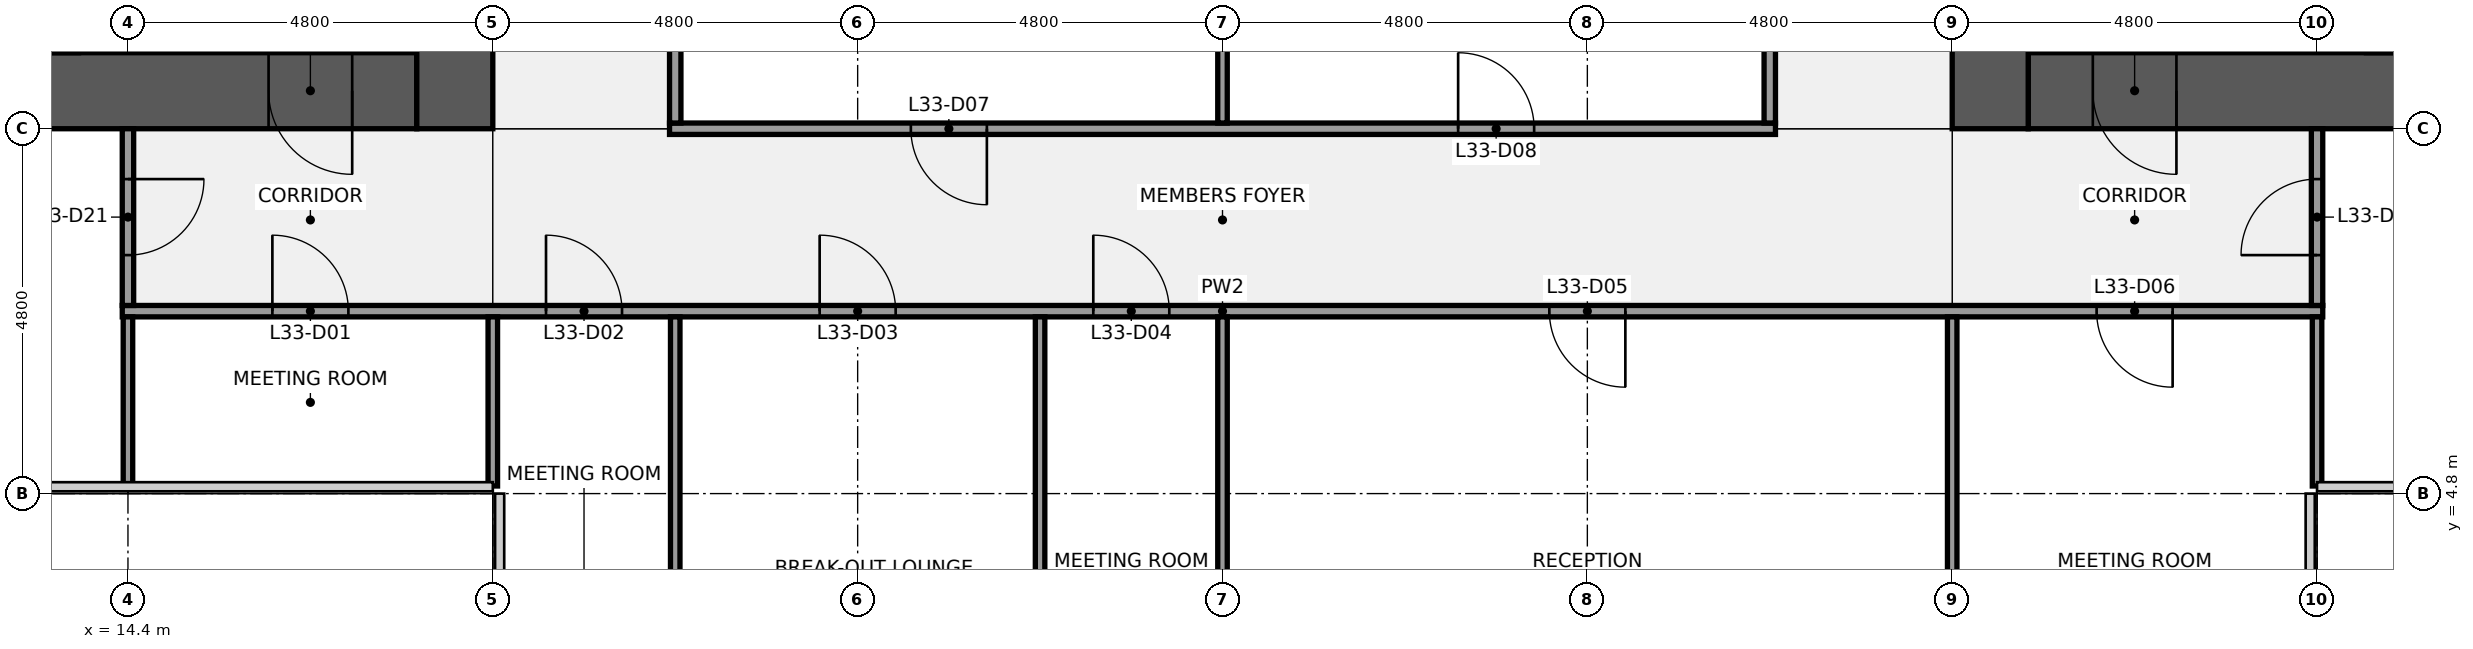
"""IFC4 building model, lengths in metres.
Left out: names, types, materials, properties, quantities, classifications, styles, units other than length and angle.
Written with IfcOpenShell. Run it as: python <this file> out.ifc"""

import sys

from ifc_helpers import new_model, si_unit, direction, frame, frame_2d, origin, place, context, subcontext, project, spatial, rectangle, extrude, element, fill, save


model = new_model("IFC4")
c1 = context("Model", 3, precision=1e-05, world=origin(), true_north=direction((0.0, 1.0)))
c2 = subcontext(c1, "Body", "Model", "MODEL_VIEW")
j1 = project(units=[si_unit("LENGTHUNIT", "METRE"), si_unit("PLANEANGLEUNIT", "RADIAN")], contexts=[c1])
p1 = place(None, origin())
s1 = spatial("IfcSite", under=j1, at=p1, CompositionType="ELEMENT")
p2 = place(p1, origin())
s2 = spatial("IfcBuilding", under=s1, at=p2, CompositionType="ELEMENT")
p3 = place(p2, frame((0.0, 0.0, 152.1)))
s3 = spatial("IfcBuildingStorey", under=s2, at=p3, CompositionType="ELEMENT", Elevation=152.1)
p4 = place(p3, frame((18.2, 10.1, 0.0), z_axis=(0.0, 0.0, 1.0), x_axis=(-1.0, 0.0, 0.0)))
e1 = element("IfcWall", 1, at=p4, inside=s3, PredefinedType="SHEAR", context=c2, shape_type="SweptSolid", body=[
    extrude(rectangle(XDim=8.6, YDim=1.0, at=frame_2d((4.3, 0.0))), origin(), (0.0, 0.0, 1.0), 3.84),
])
p5 = place(p4, frame((0.85, 0.0, 0.0)))
e2 = element("IfcOpeningElement", 2, at=p5, cuts=e1, PredefinedType="OPENING", context=c2, shape_type="SweptSolid", body=[
    extrude(rectangle(XDim=1.1, YDim=2.1, at=frame_2d((0.55, 1.05))), frame((0.0, 0.51, 0.0), z_axis=(0.0, -1.0, 0.0), x_axis=(1.0, 0.0, 0.0)), (0.0, 0.0, 1.0), 1.02),
])
p6 = place(p3, frame((18.7, 38.4, 0.0), z_axis=(0.0, 0.0, 1.0), x_axis=(0.0, -1.0, 0.0)))
e3 = element("IfcWall", 3, at=p6, inside=s3, PredefinedType="SHEAR", context=c2, shape_type="SweptSolid", body=[
    extrude(rectangle(XDim=28.8, YDim=1.0, at=frame_2d((14.4, 0.0))), origin(), (0.0, 0.0, 1.0), 3.84),
])
p7 = place(p6, frame((18.3, 0.0, 0.0)))
e4 = element("IfcOpeningElement", 4, at=p7, cuts=e3, PredefinedType="OPENING", context=c2, shape_type="SweptSolid", body=[
    extrude(rectangle(XDim=1.8, YDim=2.1, at=frame_2d((0.9, 1.05))), frame((0.0, 0.51, 0.0), z_axis=(0.0, -1.0, 0.0), x_axis=(1.0, 0.0, 0.0)), (0.0, 0.0, 1.0), 1.02),
])
p8 = place(p6, frame((8.7, 0.0, 0.0)))
e5 = element("IfcOpeningElement", 5, at=p8, cuts=e3, PredefinedType="OPENING", context=c2, shape_type="SweptSolid", body=[
    extrude(rectangle(XDim=1.8, YDim=2.1, at=frame_2d((0.9, 1.05))), frame((0.0, 0.51, 0.0), z_axis=(0.0, -1.0, 0.0), x_axis=(1.0, 0.0, 0.0)), (0.0, 0.0, 1.0), 1.02),
])
p9 = place(p3, frame((9.6, 10.7, 0.0), z_axis=(0.0, 0.0, 1.0), x_axis=(1.0, 0.0, 0.0)))
e6 = element("IfcWall", 6, at=p9, inside=s3, PredefinedType="SHEAR", context=c2, shape_type="SweptSolid", body=[
    extrude(rectangle(XDim=4.15, YDim=0.2, at=frame_2d((2.075, 0.0))), origin(), (0.0, 0.0, 1.0), 3.84),
])
p10 = place(p3, frame((48.0, 10.1, 0.0), z_axis=(0.0, 0.0, 1.0), x_axis=(-1.0, 0.0, 0.0)))
e7 = element("IfcWall", 7, at=p10, inside=s3, PredefinedType="SHEAR", context=c2, shape_type="SweptSolid", body=[
    extrude(rectangle(XDim=8.6, YDim=1.0, at=frame_2d((4.3, 0.0))), origin(), (0.0, 0.0, 1.0), 3.84),
])
p11 = place(p10, frame((6.65, 0.0, 0.0)))
e8 = element("IfcOpeningElement", 8, at=p11, cuts=e7, PredefinedType="OPENING", context=c2, shape_type="SweptSolid", body=[
    extrude(rectangle(XDim=1.1, YDim=2.1, at=frame_2d((0.55, 1.05))), frame((0.0, 0.51, 0.0), z_axis=(0.0, -1.0, 0.0), x_axis=(1.0, 0.0, 0.0)), (0.0, 0.0, 1.0), 1.02),
])
p12 = place(p3, frame((38.9, 9.6, 0.0), z_axis=(0.0, 0.0, 1.0), x_axis=(0.0, 1.0, 0.0)))
e9 = element("IfcWall", 9, at=p12, inside=s3, PredefinedType="SHEAR", context=c2, shape_type="SweptSolid", body=[
    extrude(rectangle(XDim=28.8, YDim=1.0, at=frame_2d((14.4, 0.0))), origin(), (0.0, 0.0, 1.0), 3.84),
])
p13 = place(p12, frame((8.7, 0.0, 0.0)))
e10 = element("IfcOpeningElement", 10, at=p13, cuts=e9, PredefinedType="OPENING", context=c2, shape_type="SweptSolid", body=[
    extrude(rectangle(XDim=1.8, YDim=2.1, at=frame_2d((0.9, 1.05))), frame((0.0, 0.51, 0.0), z_axis=(0.0, -1.0, 0.0), x_axis=(1.0, 0.0, 0.0)), (0.0, 0.0, 1.0), 1.02),
])
p14 = place(p12, frame((18.3, 0.0, 0.0)))
e11 = element("IfcOpeningElement", 11, at=p14, cuts=e9, PredefinedType="OPENING", context=c2, shape_type="SweptSolid", body=[
    extrude(rectangle(XDim=1.8, YDim=2.1, at=frame_2d((0.9, 1.05))), frame((0.0, 0.51, 0.0), z_axis=(0.0, -1.0, 0.0), x_axis=(1.0, 0.0, 0.0)), (0.0, 0.0, 1.0), 1.02),
])
p15 = place(p3, frame((43.85, 10.7, 0.0), z_axis=(0.0, 0.0, 1.0), x_axis=(1.0, 0.0, 0.0)))
e12 = element("IfcWall", 12, at=p15, inside=s3, PredefinedType="SHEAR", context=c2, shape_type="SweptSolid", body=[
    extrude(rectangle(XDim=4.15, YDim=0.2, at=frame_2d((2.075, 0.0))), origin(), (0.0, 0.0, 1.0), 3.84),
])
p16 = place(p3, frame((14.325, 7.2, 0.0), z_axis=(0.0, 0.0, 1.0), x_axis=(1.0, 0.0, 0.0)))
e13 = element("IfcWall", 13, at=p16, inside=s3, PredefinedType="PARTITIONING", context=c2, shape_type="SweptSolid", body=[
    extrude(rectangle(XDim=28.95, YDim=0.15, at=frame_2d((14.475, 0.0))), origin(), (0.0, 0.0, 1.0), 2.936),
])
p17 = place(p16, frame((1.975, 0.0, 0.0)))
e14 = element("IfcOpeningElement", 14, at=p17, cuts=e13, PredefinedType="OPENING", context=c2, shape_type="SweptSolid", body=[
    extrude(rectangle(XDim=1.0, YDim=2.1, at=frame_2d((0.5, 1.05))), frame((0.0, 0.085, 0.0), z_axis=(0.0, -1.0, 0.0), x_axis=(1.0, 0.0, 0.0)), (0.0, 0.0, 1.0), 0.17),
])
p18 = place(p16, frame((5.575, 0.0, 0.0)))
e15 = element("IfcOpeningElement", 15, at=p18, cuts=e13, PredefinedType="OPENING", context=c2, shape_type="SweptSolid", body=[
    extrude(rectangle(XDim=1.0, YDim=2.1, at=frame_2d((0.5, 1.05))), frame((0.0, 0.085, 0.0), z_axis=(0.0, -1.0, 0.0), x_axis=(1.0, 0.0, 0.0)), (0.0, 0.0, 1.0), 0.17),
])
p19 = place(p16, frame((9.175, 0.0, 0.0)))
e16 = element("IfcOpeningElement", 16, at=p19, cuts=e13, PredefinedType="OPENING", context=c2, shape_type="SweptSolid", body=[
    extrude(rectangle(XDim=1.0, YDim=2.1, at=frame_2d((0.5, 1.05))), frame((0.0, 0.085, 0.0), z_axis=(0.0, -1.0, 0.0), x_axis=(1.0, 0.0, 0.0)), (0.0, 0.0, 1.0), 0.17),
])
p20 = place(p16, frame((12.775, 0.0, 0.0)))
e17 = element("IfcOpeningElement", 17, at=p20, cuts=e13, PredefinedType="OPENING", context=c2, shape_type="SweptSolid", body=[
    extrude(rectangle(XDim=1.0, YDim=2.1, at=frame_2d((0.5, 1.05))), frame((0.0, 0.085, 0.0), z_axis=(0.0, -1.0, 0.0), x_axis=(1.0, 0.0, 0.0)), (0.0, 0.0, 1.0), 0.17),
])
p21 = place(p16, frame((18.775, 0.0, 0.0)))
e18 = element("IfcOpeningElement", 18, at=p21, cuts=e13, PredefinedType="OPENING", context=c2, shape_type="SweptSolid", body=[
    extrude(rectangle(XDim=1.0, YDim=2.1, at=frame_2d((0.5, 1.05))), frame((0.0, 0.085, 0.0), z_axis=(0.0, -1.0, 0.0), x_axis=(1.0, 0.0, 0.0)), (0.0, 0.0, 1.0), 0.17),
])
p22 = place(p16, frame((25.975, 0.0, 0.0)))
e19 = element("IfcOpeningElement", 19, at=p22, cuts=e13, PredefinedType="OPENING", context=c2, shape_type="SweptSolid", body=[
    extrude(rectangle(XDim=1.0, YDim=2.1, at=frame_2d((0.5, 1.05))), frame((0.0, 0.085, 0.0), z_axis=(0.0, -1.0, 0.0), x_axis=(1.0, 0.0, 0.0)), (0.0, 0.0, 1.0), 0.17),
])
p23 = place(p3, frame((21.525, 9.6, 0.0), z_axis=(0.0, 0.0, 1.0), x_axis=(1.0, 0.0, 0.0)))
e20 = element("IfcWall", 20, at=p23, inside=s3, PredefinedType="PARTITIONING", context=c2, shape_type="SweptSolid", body=[
    extrude(rectangle(XDim=14.55, YDim=0.15, at=frame_2d((7.275, 0.0))), origin(), (0.0, 0.0, 1.0), 2.936),
])
p24 = place(p23, frame((3.175, 0.0, 0.0)))
e21 = element("IfcOpeningElement", 21, at=p24, cuts=e20, PredefinedType="OPENING", context=c2, shape_type="SweptSolid", body=[
    extrude(rectangle(XDim=1.0, YDim=2.1, at=frame_2d((0.5, 1.05))), frame((0.0, 0.085, 0.0), z_axis=(0.0, -1.0, 0.0), x_axis=(1.0, 0.0, 0.0)), (0.0, 0.0, 1.0), 0.17),
])
p25 = place(p23, frame((10.375, 0.0, 0.0)))
e22 = element("IfcOpeningElement", 22, at=p25, cuts=e20, PredefinedType="OPENING", context=c2, shape_type="SweptSolid", body=[
    extrude(rectangle(XDim=1.0, YDim=2.1, at=frame_2d((0.5, 1.05))), frame((0.0, 0.085, 0.0), z_axis=(0.0, -1.0, 0.0), x_axis=(1.0, 0.0, 0.0)), (0.0, 0.0, 1.0), 0.17),
])
p26 = place(p3, frame((14.4, 4.9, 0.0), z_axis=(0.0, 0.0, 1.0), x_axis=(0.0, 1.0, 0.0)))
e23 = element("IfcWall", 23, at=p26, inside=s3, PredefinedType="PARTITIONING", context=c2, shape_type="SweptSolid", body=[
    extrude(rectangle(XDim=2.225, YDim=0.125, at=frame_2d((1.113, 0.0))), origin(), (0.0, 0.0, 1.0), 2.936),
])
p27 = place(p3, frame((14.4, 7.275, 0.0), z_axis=(0.0, 0.0, 1.0), x_axis=(0.0, 1.0, 0.0)))
e24 = element("IfcWall", 24, at=p27, inside=s3, PredefinedType="PARTITIONING", context=c2, shape_type="SweptSolid", body=[
    extrude(rectangle(XDim=2.325, YDim=0.15, at=frame_2d((1.163, 0.0))), origin(), (0.0, 0.0, 1.0), 2.936),
])
p28 = place(p27, frame((0.663, 0.0, 0.0)))
e25 = element("IfcOpeningElement", 25, at=p28, cuts=e24, PredefinedType="OPENING", context=c2, shape_type="SweptSolid", body=[
    extrude(rectangle(XDim=1.0, YDim=2.1, at=frame_2d((0.5, 1.05))), frame((0.0, 0.085, 0.0), z_axis=(0.0, -1.0, 0.0), x_axis=(1.0, 0.0, 0.0)), (0.0, 0.0, 1.0), 0.17),
])
p29 = place(p3, frame((19.2, 4.9, 0.0), z_axis=(0.0, 0.0, 1.0), x_axis=(0.0, 1.0, 0.0)))
e26 = element("IfcWall", 26, at=p29, inside=s3, PredefinedType="PARTITIONING", context=c2, shape_type="SweptSolid", body=[
    extrude(rectangle(XDim=2.225, YDim=0.125, at=frame_2d((1.113, 0.0))), origin(), (0.0, 0.0, 1.0), 2.936),
])
p30 = place(p3, frame((21.6, 0.1, 0.0), z_axis=(0.0, 0.0, 1.0), x_axis=(0.0, 1.0, 0.0)))
e27 = element("IfcWall", 27, at=p30, inside=s3, PredefinedType="PARTITIONING", context=c2, shape_type="SweptSolid", body=[
    extrude(rectangle(XDim=7.025, YDim=0.125, at=frame_2d((3.512, 0.0))), origin(), (0.0, 0.0, 1.0), 2.936),
])
p31 = place(p3, frame((21.6, 9.675, 0.0), z_axis=(0.0, 0.0, 1.0), x_axis=(0.0, 1.0, 0.0)))
e28 = element("IfcWall", 28, at=p31, inside=s3, PredefinedType="PARTITIONING", context=c2, shape_type="SweptSolid", body=[
    extrude(rectangle(XDim=4.65, YDim=0.15, at=frame_2d((2.325, 0.0))), origin(), (0.0, 0.0, 1.0), 2.936),
])
p32 = place(p3, frame((26.4, 0.1, 0.0), z_axis=(0.0, 0.0, 1.0), x_axis=(0.0, 1.0, 0.0)))
e29 = element("IfcWall", 29, at=p32, inside=s3, PredefinedType="PARTITIONING", context=c2, shape_type="SweptSolid", body=[
    extrude(rectangle(XDim=7.025, YDim=0.125, at=frame_2d((3.512, 0.0))), origin(), (0.0, 0.0, 1.0), 2.936),
])
p33 = place(p3, frame((28.8, 0.6, 0.0), z_axis=(0.0, 0.0, 1.0), x_axis=(0.0, 1.0, 0.0)))
e30 = element("IfcWall", 30, at=p33, inside=s3, PredefinedType="PARTITIONING", context=c2, shape_type="SweptSolid", body=[
    extrude(rectangle(XDim=6.525, YDim=0.125, at=frame_2d((3.262, 0.0))), origin(), (0.0, 0.0, 1.0), 2.936),
])
p34 = place(p3, frame((28.8, 9.675, 0.0), z_axis=(0.0, 0.0, 1.0), x_axis=(0.0, 1.0, 0.0)))
e31 = element("IfcWall", 31, at=p34, inside=s3, PredefinedType="PARTITIONING", context=c2, shape_type="SweptSolid", body=[
    extrude(rectangle(XDim=4.662, YDim=0.125, at=frame_2d((2.331, 0.0))), origin(), (0.0, 0.0, 1.0), 2.936),
])
p35 = place(p3, frame((36.0, 9.675, 0.0), z_axis=(0.0, 0.0, 1.0), x_axis=(0.0, 1.0, 0.0)))
e32 = element("IfcWall", 32, at=p35, inside=s3, PredefinedType="PARTITIONING", context=c2, shape_type="SweptSolid", body=[
    extrude(rectangle(XDim=4.65, YDim=0.15, at=frame_2d((2.325, 0.0))), origin(), (0.0, 0.0, 1.0), 2.936),
])
p36 = place(p3, frame((38.4, 0.6, 0.0), z_axis=(0.0, 0.0, 1.0), x_axis=(0.0, 1.0, 0.0)))
e33 = element("IfcWall", 33, at=p36, inside=s3, PredefinedType="PARTITIONING", context=c2, shape_type="SweptSolid", body=[
    extrude(rectangle(XDim=6.525, YDim=0.125, at=frame_2d((3.262, 0.0))), origin(), (0.0, 0.0, 1.0), 2.936),
])
p37 = place(p3, frame((43.2, 4.9, 0.0), z_axis=(0.0, 0.0, 1.0), x_axis=(0.0, 1.0, 0.0)))
e34 = element("IfcWall", 34, at=p37, inside=s3, PredefinedType="PARTITIONING", context=c2, shape_type="SweptSolid", body=[
    extrude(rectangle(XDim=2.225, YDim=0.125, at=frame_2d((1.113, 0.0))), origin(), (0.0, 0.0, 1.0), 2.936),
])
p38 = place(p3, frame((43.2, 7.275, 0.0), z_axis=(0.0, 0.0, 1.0), x_axis=(0.0, 1.0, 0.0)))
e35 = element("IfcWall", 35, at=p38, inside=s3, PredefinedType="PARTITIONING", context=c2, shape_type="SweptSolid", body=[
    extrude(rectangle(XDim=2.325, YDim=0.15, at=frame_2d((1.163, 0.0))), origin(), (0.0, 0.0, 1.0), 2.936),
])
p39 = place(p38, frame((0.663, 0.0, 0.0)))
e36 = element("IfcOpeningElement", 36, at=p39, cuts=e35, PredefinedType="OPENING", context=c2, shape_type="SweptSolid", body=[
    extrude(rectangle(XDim=1.0, YDim=2.1, at=frame_2d((0.5, 1.05))), frame((0.0, 0.085, 0.0), z_axis=(0.0, -1.0, 0.0), x_axis=(1.0, 0.0, 0.0)), (0.0, 0.0, 1.0), 0.17),
])
p40 = place(p5, origin())
e37 = element("IfcDoor", 37, at=p40, inside=s3, OperationType="SINGLE_SWING_LEFT", PredefinedType="DOOR", context=c2, shape_type="SweptSolid", body=[
    extrude(rectangle(XDim=1.1, YDim=2.1, at=frame_2d((0.55, 1.05))), frame((0.0, 0.025, 0.0), z_axis=(0.0, -1.0, 0.0), x_axis=(1.0, 0.0, 0.0)), (0.0, 0.0, 1.0), 0.05),
])
fill(e2, e37)
p41 = place(p11, origin())
e38 = element("IfcDoor", 38, at=p41, inside=s3, OperationType="SINGLE_SWING_LEFT", PredefinedType="DOOR", context=c2, shape_type="SweptSolid", body=[
    extrude(rectangle(XDim=1.1, YDim=2.1, at=frame_2d((0.55, 1.05))), frame((0.0, 0.025, 0.0), z_axis=(0.0, -1.0, 0.0), x_axis=(1.0, 0.0, 0.0)), (0.0, 0.0, 1.0), 0.05),
])
fill(e8, e38)
p42 = place(p17, origin())
e39 = element("IfcDoor", 39, at=p42, inside=s3, OperationType="SINGLE_SWING_LEFT", PredefinedType="DOOR", context=c2, shape_type="SweptSolid", body=[
    extrude(rectangle(XDim=1.0, YDim=2.1, at=frame_2d((0.5, 1.05))), frame((0.0, 0.025, 0.0), z_axis=(0.0, -1.0, 0.0), x_axis=(1.0, 0.0, 0.0)), (0.0, 0.0, 1.0), 0.05),
])
fill(e14, e39)
p43 = place(p18, origin())
e40 = element("IfcDoor", 40, at=p43, inside=s3, OperationType="SINGLE_SWING_LEFT", PredefinedType="DOOR", context=c2, shape_type="SweptSolid", body=[
    extrude(rectangle(XDim=1.0, YDim=2.1, at=frame_2d((0.5, 1.05))), frame((0.0, 0.025, 0.0), z_axis=(0.0, -1.0, 0.0), x_axis=(1.0, 0.0, 0.0)), (0.0, 0.0, 1.0), 0.05),
])
fill(e15, e40)
p44 = place(p19, origin())
e41 = element("IfcDoor", 41, at=p44, inside=s3, OperationType="SINGLE_SWING_LEFT", PredefinedType="DOOR", context=c2, shape_type="SweptSolid", body=[
    extrude(rectangle(XDim=1.0, YDim=2.1, at=frame_2d((0.5, 1.05))), frame((0.0, 0.025, 0.0), z_axis=(0.0, -1.0, 0.0), x_axis=(1.0, 0.0, 0.0)), (0.0, 0.0, 1.0), 0.05),
])
fill(e16, e41)
p45 = place(p20, origin())
e42 = element("IfcDoor", 42, at=p45, inside=s3, OperationType="SINGLE_SWING_LEFT", PredefinedType="DOOR", context=c2, shape_type="SweptSolid", body=[
    extrude(rectangle(XDim=1.0, YDim=2.1, at=frame_2d((0.5, 1.05))), frame((0.0, 0.025, 0.0), z_axis=(0.0, -1.0, 0.0), x_axis=(1.0, 0.0, 0.0)), (0.0, 0.0, 1.0), 0.05),
])
fill(e17, e42)
p46 = place(p21, origin())
e43 = element("IfcDoor", 43, at=p46, inside=s3, OperationType="SINGLE_SWING_RIGHT", PredefinedType="DOOR", context=c2, shape_type="SweptSolid", body=[
    extrude(rectangle(XDim=1.0, YDim=2.1, at=frame_2d((0.5, 1.05))), frame((0.0, 0.025, 0.0), z_axis=(0.0, -1.0, 0.0), x_axis=(1.0, 0.0, 0.0)), (0.0, 0.0, 1.0), 0.05),
])
fill(e18, e43)
p47 = place(p22, origin())
e44 = element("IfcDoor", 44, at=p47, inside=s3, OperationType="SINGLE_SWING_RIGHT", PredefinedType="DOOR", context=c2, shape_type="SweptSolid", body=[
    extrude(rectangle(XDim=1.0, YDim=2.1, at=frame_2d((0.5, 1.05))), frame((0.0, 0.025, 0.0), z_axis=(0.0, -1.0, 0.0), x_axis=(1.0, 0.0, 0.0)), (0.0, 0.0, 1.0), 0.05),
])
fill(e19, e44)
p48 = place(p24, origin())
e45 = element("IfcDoor", 45, at=p48, inside=s3, OperationType="SINGLE_SWING_RIGHT", PredefinedType="DOOR", context=c2, shape_type="SweptSolid", body=[
    extrude(rectangle(XDim=1.0, YDim=2.1, at=frame_2d((0.5, 1.05))), frame((0.0, 0.025, 0.0), z_axis=(0.0, -1.0, 0.0), x_axis=(1.0, 0.0, 0.0)), (0.0, 0.0, 1.0), 0.05),
])
fill(e21, e45)
p49 = place(p25, origin())
e46 = element("IfcDoor", 46, at=p49, inside=s3, OperationType="SINGLE_SWING_LEFT", PredefinedType="DOOR", context=c2, shape_type="SweptSolid", body=[
    extrude(rectangle(XDim=1.0, YDim=2.1, at=frame_2d((0.5, 1.05))), frame((0.0, 0.025, 0.0), z_axis=(0.0, -1.0, 0.0), x_axis=(1.0, 0.0, 0.0)), (0.0, 0.0, 1.0), 0.05),
])
fill(e22, e46)
p50 = place(p28, origin())
e47 = element("IfcDoor", 47, at=p50, inside=s3, OperationType="SINGLE_SWING_RIGHT", PredefinedType="DOOR", context=c2, shape_type="SweptSolid", body=[
    extrude(rectangle(XDim=1.0, YDim=2.1, at=frame_2d((0.5, 1.05))), frame((0.0, 0.025, 0.0), z_axis=(0.0, -1.0, 0.0), x_axis=(1.0, 0.0, 0.0)), (0.0, 0.0, 1.0), 0.05),
])
fill(e25, e47)
p51 = place(p39, origin())
e48 = element("IfcDoor", 48, at=p51, inside=s3, OperationType="SINGLE_SWING_LEFT", PredefinedType="DOOR", context=c2, shape_type="SweptSolid", body=[
    extrude(rectangle(XDim=1.0, YDim=2.1, at=frame_2d((0.5, 1.05))), frame((0.0, 0.025, 0.0), z_axis=(0.0, -1.0, 0.0), x_axis=(1.0, 0.0, 0.0)), (0.0, 0.0, 1.0), 0.05),
])
fill(e36, e48)
save(model, sys.argv[1])
